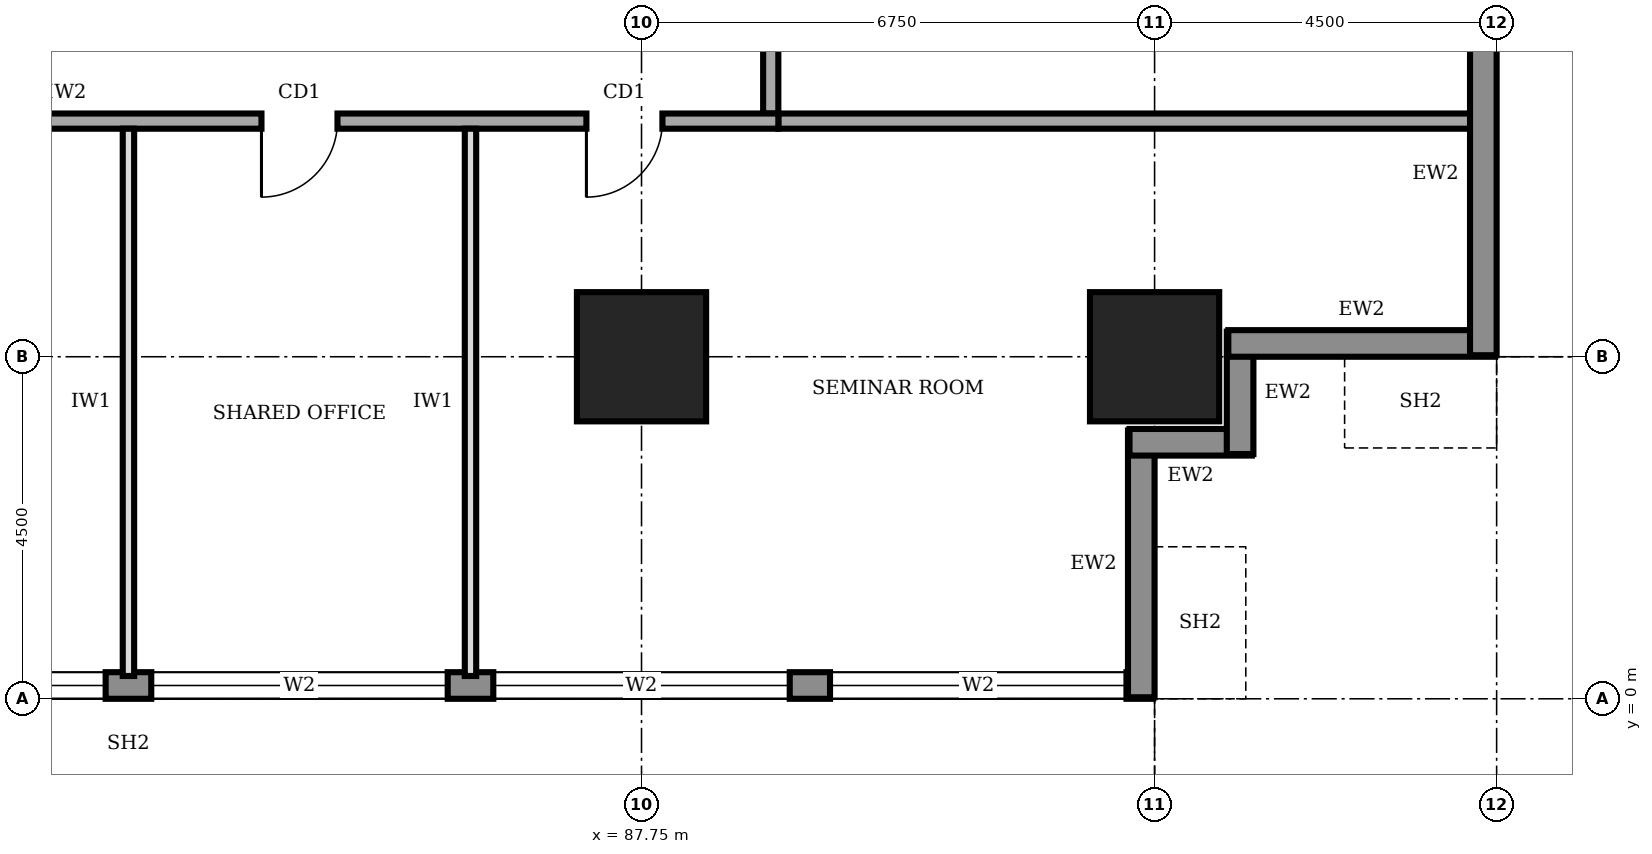
"""IFC4 building model, lengths in metres.
Left out: names, types, materials, properties, quantities, classifications, styles, units other than length and angle.
Written with IfcOpenShell. Run it as: python <this file> out.ifc"""

import sys

from ifc_helpers import new_model, si_unit, direction, frame, frame_2d, origin, origin_2d, place, context, subcontext, project, spatial, rectangle, extrude, element, fill, save


model = new_model("IFC4")
c1 = context("Model", 3, precision=1e-05, world=origin(), true_north=direction((0.0, 1.0)))
c2 = subcontext(c1, "Body", "Model", "MODEL_VIEW")
j1 = project(units=[si_unit("LENGTHUNIT", "METRE"), si_unit("PLANEANGLEUNIT", "RADIAN")], contexts=[c1])
p1 = place(None, origin())
s1 = spatial("IfcSite", under=j1, at=p1, CompositionType="ELEMENT")
p2 = place(p1, origin())
s2 = spatial("IfcBuilding", under=s1, at=p2, CompositionType="ELEMENT")
p3 = place(p2, frame((0.0, 0.0, 65.0)))
s3 = spatial("IfcBuildingStorey", under=s2, at=p3, CompositionType="ELEMENT", Elevation=65.0)
for number, where, z_axis, x_axis in (
    (1, (87.75, 4.5, 0.0), (0.0, 0.0, 1.0), (1.0, 0.0, 0.0)),
    (2, (94.5, 4.5, 0.0), (0.0, 0.0, 1.0), (1.0, 0.0, 0.0)),
):
    element("IfcColumn", number, at=place(p3, frame(where, z_axis=z_axis, x_axis=x_axis)), inside=s3, PredefinedType="COLUMN", context=c2, shape_type="SweptSolid", body=[
        extrude(rectangle(XDim=1.7, YDim=1.7, at=origin_2d()), origin(), (0.0, 0.0, 1.0), 4.0),
    ])
p4 = place(p3, frame((67.52, 0.175, 0.0), z_axis=(0.0, 0.0, 1.0), x_axis=(1.0, 0.0, 0.0)))
e3 = element("IfcWall", 3, at=p4, inside=s3, PredefinedType="STANDARD", context=c2, shape_type="SweptSolid", body=[
    extrude(rectangle(XDim=26.96, YDim=0.35, at=frame_2d((13.48, 0.0))), origin(), (0.0, 0.0, 1.0), 3.75),
])
p5 = place(p4, frame((4.78, 0.0, 0.6)))
e4 = element("IfcOpeningElement", 4, at=p5, cuts=e3, PredefinedType="OPENING", context=c2, shape_type="SweptSolid", body=[
    extrude(rectangle(XDim=3.9, YDim=2.6, at=frame_2d((1.95, 1.3))), frame((0.0, 0.185, 0.0), z_axis=(0.0, -1.0, 0.0), x_axis=(1.0, 0.0, 0.0)), (0.0, 0.0, 1.0), 0.37),
])
p6 = place(p4, frame((9.28, 0.0, 0.6)))
e5 = element("IfcOpeningElement", 5, at=p6, cuts=e3, PredefinedType="OPENING", context=c2, shape_type="SweptSolid", body=[
    extrude(rectangle(XDim=3.9, YDim=2.6, at=frame_2d((1.95, 1.3))), frame((0.0, 0.185, 0.0), z_axis=(0.0, -1.0, 0.0), x_axis=(1.0, 0.0, 0.0)), (0.0, 0.0, 1.0), 0.37),
])
p7 = place(p4, frame((13.78, 0.0, 0.6)))
e6 = element("IfcOpeningElement", 6, at=p7, cuts=e3, PredefinedType="OPENING", context=c2, shape_type="SweptSolid", body=[
    extrude(rectangle(XDim=3.9, YDim=2.6, at=frame_2d((1.95, 1.3))), frame((0.0, 0.185, 0.0), z_axis=(0.0, -1.0, 0.0), x_axis=(1.0, 0.0, 0.0)), (0.0, 0.0, 1.0), 0.37),
])
p8 = place(p4, frame((18.28, 0.0, 0.6)))
e7 = element("IfcOpeningElement", 7, at=p8, cuts=e3, PredefinedType="OPENING", context=c2, shape_type="SweptSolid", body=[
    extrude(rectangle(XDim=3.9, YDim=2.6, at=frame_2d((1.95, 1.3))), frame((0.0, 0.185, 0.0), z_axis=(0.0, -1.0, 0.0), x_axis=(1.0, 0.0, 0.0)), (0.0, 0.0, 1.0), 0.37),
])
p9 = place(p4, frame((22.71, 0.0, 0.6)))
e8 = element("IfcOpeningElement", 8, at=p9, cuts=e3, PredefinedType="OPENING", context=c2, shape_type="SweptSolid", body=[
    extrude(rectangle(XDim=3.9, YDim=2.6, at=frame_2d((1.95, 1.3))), frame((0.0, 0.185, 0.0), z_axis=(0.0, -1.0, 0.0), x_axis=(1.0, 0.0, 0.0)), (0.0, 0.0, 1.0), 0.37),
])
p10 = place(p3, frame((94.325, 0.02, 0.0), z_axis=(0.0, 0.0, 1.0), x_axis=(0.0, 1.0, 0.0)))
e9 = element("IfcWall", 9, at=p10, inside=s3, PredefinedType="STANDARD", context=c2, shape_type="SweptSolid", body=[
    extrude(rectangle(XDim=3.51, YDim=0.35, at=frame_2d((1.755, 0.0))), origin(), (0.0, 0.0, 1.0), 2.85),
])
for number, where, z_axis, x_axis in (
    (10, (94.17, 3.375, 0.0), (0.0, 0.0, 1.0), (1.0, 0.0, 0.0)),
    (11, (95.625, 3.22, 0.0), (0.0, 0.0, 1.0), (0.0, 1.0, 0.0)),
):
    element("IfcWall", number, at=place(p3, frame(where, z_axis=z_axis, x_axis=x_axis)), inside=s3, PredefinedType="STANDARD", context=c2, shape_type="SweptSolid", body=[
        extrude(rectangle(XDim=1.61, YDim=0.35, at=frame_2d((0.805, 0.0))), origin(), (0.0, 0.0, 1.0), 3.75),
    ])
p11 = place(p3, frame((95.47, 4.675, 0.0), z_axis=(0.0, 0.0, 1.0), x_axis=(1.0, 0.0, 0.0)))
e12 = element("IfcWall", 12, at=p11, inside=s3, PredefinedType="STANDARD", context=c2, shape_type="SweptSolid", body=[
    extrude(rectangle(XDim=3.51, YDim=0.35, at=frame_2d((1.755, 0.0))), origin(), (0.0, 0.0, 1.0), 2.85),
])
p12 = place(p3, frame((98.825, 4.52, 0.0), z_axis=(0.0, 0.0, 1.0), x_axis=(0.0, 1.0, 0.0)))
e13 = element("IfcWall", 13, at=p12, inside=s3, PredefinedType="STANDARD", context=c2, shape_type="SweptSolid", body=[
    extrude(rectangle(XDim=31.46, YDim=0.35, at=frame_2d((15.73, 0.0))), origin(), (0.0, 0.0, 1.0), 3.75),
])
p13 = place(p12, frame((4.78, 0.0, 0.6)))
e14 = element("IfcOpeningElement", 14, at=p13, cuts=e13, PredefinedType="OPENING", context=c2, shape_type="SweptSolid", body=[
    extrude(rectangle(XDim=3.9, YDim=2.6, at=frame_2d((1.95, 1.3))), frame((0.0, 0.185, 0.0), z_axis=(0.0, -1.0, 0.0), x_axis=(1.0, 0.0, 0.0)), (0.0, 0.0, 1.0), 0.37),
])
p14 = place(p12, frame((9.28, 0.0, 0.6)))
e15 = element("IfcOpeningElement", 15, at=p14, cuts=e13, PredefinedType="OPENING", context=c2, shape_type="SweptSolid", body=[
    extrude(rectangle(XDim=3.9, YDim=2.6, at=frame_2d((1.95, 1.3))), frame((0.0, 0.185, 0.0), z_axis=(0.0, -1.0, 0.0), x_axis=(1.0, 0.0, 0.0)), (0.0, 0.0, 1.0), 0.37),
])
p15 = place(p12, frame((13.78, 0.0, 0.6)))
e16 = element("IfcOpeningElement", 16, at=p15, cuts=e13, PredefinedType="OPENING", context=c2, shape_type="SweptSolid", body=[
    extrude(rectangle(XDim=3.9, YDim=2.6, at=frame_2d((1.95, 1.3))), frame((0.0, 0.185, 0.0), z_axis=(0.0, -1.0, 0.0), x_axis=(1.0, 0.0, 0.0)), (0.0, 0.0, 1.0), 0.37),
])
p16 = place(p12, frame((18.28, 0.0, 0.6)))
e17 = element("IfcOpeningElement", 17, at=p16, cuts=e13, PredefinedType="OPENING", context=c2, shape_type="SweptSolid", body=[
    extrude(rectangle(XDim=3.9, YDim=2.6, at=frame_2d((1.95, 1.3))), frame((0.0, 0.185, 0.0), z_axis=(0.0, -1.0, 0.0), x_axis=(1.0, 0.0, 0.0)), (0.0, 0.0, 1.0), 0.37),
])
p17 = place(p12, frame((22.78, 0.0, 0.6)))
e18 = element("IfcOpeningElement", 18, at=p17, cuts=e13, PredefinedType="OPENING", context=c2, shape_type="SweptSolid", body=[
    extrude(rectangle(XDim=3.9, YDim=2.6, at=frame_2d((1.95, 1.3))), frame((0.0, 0.185, 0.0), z_axis=(0.0, -1.0, 0.0), x_axis=(1.0, 0.0, 0.0)), (0.0, 0.0, 1.0), 0.37),
])
p18 = place(p12, frame((27.21, 0.0, 0.6)))
e19 = element("IfcOpeningElement", 19, at=p18, cuts=e13, PredefinedType="OPENING", context=c2, shape_type="SweptSolid", body=[
    extrude(rectangle(XDim=3.9, YDim=2.6, at=frame_2d((1.95, 1.3))), frame((0.0, 0.185, 0.0), z_axis=(0.0, -1.0, 0.0), x_axis=(1.0, 0.0, 0.0)), (0.0, 0.0, 1.0), 0.37),
])
p19 = place(p3, frame((72.65, 7.6, 0.0), z_axis=(0.0, 0.0, 1.0), x_axis=(1.0, 0.0, 0.0)))
e20 = element("IfcWall", 20, at=p19, inside=s3, PredefinedType="SOLIDWALL", context=c2, shape_type="SweptSolid", body=[
    extrude(rectangle(XDim=16.9, YDim=0.2, at=frame_2d((8.45, 0.0))), origin(), (0.0, 0.0, 1.0), 3.75),
])
p20 = place(p19, frame((3.175, 0.0, 0.0)))
e21 = element("IfcOpeningElement", 21, at=p20, cuts=e20, PredefinedType="OPENING", context=c2, shape_type="SweptSolid", body=[
    extrude(rectangle(XDim=1.8, YDim=2.1, at=frame_2d((0.9, 1.05))), frame((0.0, 0.11, 0.0), z_axis=(0.0, -1.0, 0.0), x_axis=(1.0, 0.0, 0.0)), (0.0, 0.0, 1.0), 0.22),
])
p21 = place(p19, frame((10.1, 0.0, 0.0)))
e22 = element("IfcOpeningElement", 22, at=p21, cuts=e20, PredefinedType="OPENING", context=c2, shape_type="SweptSolid", body=[
    extrude(rectangle(XDim=1.0, YDim=2.1, at=frame_2d((0.5, 1.05))), frame((0.0, 0.11, 0.0), z_axis=(0.0, -1.0, 0.0), x_axis=(1.0, 0.0, 0.0)), (0.0, 0.0, 1.0), 0.22),
])
p22 = place(p19, frame((14.375, 0.0, 0.0)))
e23 = element("IfcOpeningElement", 23, at=p22, cuts=e20, PredefinedType="OPENING", context=c2, shape_type="SweptSolid", body=[
    extrude(rectangle(XDim=1.0, YDim=2.1, at=frame_2d((0.5, 1.05))), frame((0.0, 0.11, 0.0), z_axis=(0.0, -1.0, 0.0), x_axis=(1.0, 0.0, 0.0)), (0.0, 0.0, 1.0), 0.22),
])
p23 = place(p3, frame((89.45, 7.7, 0.0), z_axis=(0.0, 0.0, 1.0), x_axis=(0.0, 1.0, 0.0)))
e24 = element("IfcWall", 24, at=p23, inside=s3, PredefinedType="SOLIDWALL", context=c2, shape_type="SweptSolid", body=[
    extrude(rectangle(XDim=25.3, YDim=0.2, at=frame_2d((12.65, 0.0))), origin(), (0.0, 0.0, 1.0), 3.75),
])
p24 = place(p23, frame((2.3, 0.0, 0.0)))
e25 = element("IfcOpeningElement", 25, at=p24, cuts=e24, PredefinedType="OPENING", context=c2, shape_type="SweptSolid", body=[
    extrude(rectangle(XDim=1.0, YDim=2.1, at=frame_2d((0.5, 1.05))), frame((0.0, 0.11, 0.0), z_axis=(0.0, -1.0, 0.0), x_axis=(1.0, 0.0, 0.0)), (0.0, 0.0, 1.0), 0.22),
])
p25 = place(p23, frame((6.55, 0.0, 0.0)))
e26 = element("IfcOpeningElement", 26, at=p25, cuts=e24, PredefinedType="OPENING", context=c2, shape_type="SweptSolid", body=[
    extrude(rectangle(XDim=0.9, YDim=2.1, at=frame_2d((0.45, 1.05))), frame((0.0, 0.11, 0.0), z_axis=(0.0, -1.0, 0.0), x_axis=(1.0, 0.0, 0.0)), (0.0, 0.0, 1.0), 0.22),
])
p26 = place(p23, frame((9.75, 0.0, 0.0)))
e27 = element("IfcOpeningElement", 27, at=p26, cuts=e24, PredefinedType="OPENING", context=c2, shape_type="SweptSolid", body=[
    extrude(rectangle(XDim=0.9, YDim=2.1, at=frame_2d((0.45, 1.05))), frame((0.0, 0.11, 0.0), z_axis=(0.0, -1.0, 0.0), x_axis=(1.0, 0.0, 0.0)), (0.0, 0.0, 1.0), 0.22),
])
p27 = place(p23, frame((15.3, 0.0, 0.0)))
e28 = element("IfcOpeningElement", 28, at=p27, cuts=e24, PredefinedType="OPENING", context=c2, shape_type="SweptSolid", body=[
    extrude(rectangle(XDim=0.9, YDim=2.1, at=frame_2d((0.45, 1.05))), frame((0.0, 0.11, 0.0), z_axis=(0.0, -1.0, 0.0), x_axis=(1.0, 0.0, 0.0)), (0.0, 0.0, 1.0), 0.22),
])
p28 = place(p23, frame((17.8, 0.0, 0.0)))
e29 = element("IfcOpeningElement", 29, at=p28, cuts=e24, PredefinedType="OPENING", context=c2, shape_type="SweptSolid", body=[
    extrude(rectangle(XDim=1.0, YDim=2.1, at=frame_2d((0.5, 1.05))), frame((0.0, 0.11, 0.0), z_axis=(0.0, -1.0, 0.0), x_axis=(1.0, 0.0, 0.0)), (0.0, 0.0, 1.0), 0.22),
])
p29 = place(p23, frame((12.7, 0.0, 0.0)))
e30 = element("IfcOpeningElement", 30, at=p29, cuts=e24, PredefinedType="OPENING", context=c2, shape_type="SweptSolid", body=[
    extrude(rectangle(XDim=1.0, YDim=2.1, at=frame_2d((0.5, 1.05))), frame((0.0, 0.11, 0.0), z_axis=(0.0, -1.0, 0.0), x_axis=(1.0, 0.0, 0.0)), (0.0, 0.0, 1.0), 0.22),
])
p30 = place(p23, frame((21.8, 0.0, 0.0)))
e31 = element("IfcOpeningElement", 31, at=p30, cuts=e24, PredefinedType="OPENING", context=c2, shape_type="SweptSolid", body=[
    extrude(rectangle(XDim=1.0, YDim=2.1, at=frame_2d((0.5, 1.05))), frame((0.0, 0.11, 0.0), z_axis=(0.0, -1.0, 0.0), x_axis=(1.0, 0.0, 0.0)), (0.0, 0.0, 1.0), 0.22),
])
p31 = place(p3, frame((89.55, 7.6, 0.0), z_axis=(0.0, 0.0, 1.0), x_axis=(1.0, 0.0, 0.0)))
e32 = element("IfcWall", 32, at=p31, inside=s3, PredefinedType="SOLIDWALL", context=c2, shape_type="SweptSolid", body=[
    extrude(rectangle(XDim=9.15, YDim=0.2, at=frame_2d((4.575, 0.0))), origin(), (0.0, 0.0, 1.0), 3.75),
])
for number, where, z_axis, x_axis in (
    (33, (81.0, 0.3, 0.0), (0.0, 0.0, 1.0), (0.0, 1.0, 0.0)),
    (34, (85.5, 0.3, 0.0), (0.0, 0.0, 1.0), (0.0, 1.0, 0.0)),
):
    element("IfcWall", number, at=place(p3, frame(where, z_axis=z_axis, x_axis=x_axis)), inside=s3, PredefinedType="PARTITIONING", context=c2, shape_type="SweptSolid", body=[
        extrude(rectangle(XDim=7.2, YDim=0.15, at=frame_2d((3.6, 0.0))), origin(), (0.0, 0.0, 1.0), 3.75),
    ])
p32 = place(p6, origin())
e35 = element("IfcWindow", 35, at=p32, inside=s3, PartitioningType="SINGLE_PANEL", PredefinedType="WINDOW", context=c2, shape_type="SweptSolid", body=[
    extrude(rectangle(XDim=3.9, YDim=2.6, at=frame_2d((1.95, 1.3))), frame((0.0, 0.03, 0.0), z_axis=(0.0, -1.0, 0.0), x_axis=(1.0, 0.0, 0.0)), (0.0, 0.0, 1.0), 0.06),
])
fill(e5, e35)
p33 = place(p7, origin())
e36 = element("IfcWindow", 36, at=p33, inside=s3, PartitioningType="SINGLE_PANEL", PredefinedType="WINDOW", context=c2, shape_type="SweptSolid", body=[
    extrude(rectangle(XDim=3.9, YDim=2.6, at=frame_2d((1.95, 1.3))), frame((0.0, 0.03, 0.0), z_axis=(0.0, -1.0, 0.0), x_axis=(1.0, 0.0, 0.0)), (0.0, 0.0, 1.0), 0.06),
])
fill(e6, e36)
p34 = place(p8, origin())
e37 = element("IfcWindow", 37, at=p34, inside=s3, PartitioningType="SINGLE_PANEL", PredefinedType="WINDOW", context=c2, shape_type="SweptSolid", body=[
    extrude(rectangle(XDim=3.9, YDim=2.6, at=frame_2d((1.95, 1.3))), frame((0.0, 0.03, 0.0), z_axis=(0.0, -1.0, 0.0), x_axis=(1.0, 0.0, 0.0)), (0.0, 0.0, 1.0), 0.06),
])
fill(e7, e37)
p35 = place(p9, origin())
e38 = element("IfcWindow", 38, at=p35, inside=s3, PartitioningType="SINGLE_PANEL", PredefinedType="WINDOW", context=c2, shape_type="SweptSolid", body=[
    extrude(rectangle(XDim=3.9, YDim=2.6, at=frame_2d((1.95, 1.3))), frame((0.0, 0.03, 0.0), z_axis=(0.0, -1.0, 0.0), x_axis=(1.0, 0.0, 0.0)), (0.0, 0.0, 1.0), 0.06),
])
fill(e8, e38)
p36 = place(p21, frame((1.0, 0.0, 0.0), z_axis=(0.0, 0.0, 1.0), x_axis=(-1.0, 0.0, 0.0)))
e39 = element("IfcDoor", 39, at=p36, inside=s3, OperationType="SINGLE_SWING_RIGHT", PredefinedType="DOOR", context=c2, shape_type="SweptSolid", body=[
    extrude(rectangle(XDim=1.0, YDim=2.1, at=frame_2d((0.5, 1.05))), frame((0.0, 0.025, 0.0), z_axis=(0.0, -1.0, 0.0), x_axis=(1.0, 0.0, 0.0)), (0.0, 0.0, 1.0), 0.05),
])
fill(e22, e39)
p37 = place(p22, frame((1.0, 0.0, 0.0), z_axis=(0.0, 0.0, 1.0), x_axis=(-1.0, 0.0, 0.0)))
e40 = element("IfcDoor", 40, at=p37, inside=s3, OperationType="SINGLE_SWING_RIGHT", PredefinedType="DOOR", context=c2, shape_type="SweptSolid", body=[
    extrude(rectangle(XDim=1.0, YDim=2.1, at=frame_2d((0.5, 1.05))), frame((0.0, 0.025, 0.0), z_axis=(0.0, -1.0, 0.0), x_axis=(1.0, 0.0, 0.0)), (0.0, 0.0, 1.0), 0.05),
])
fill(e23, e40)
save(model, sys.argv[1])
